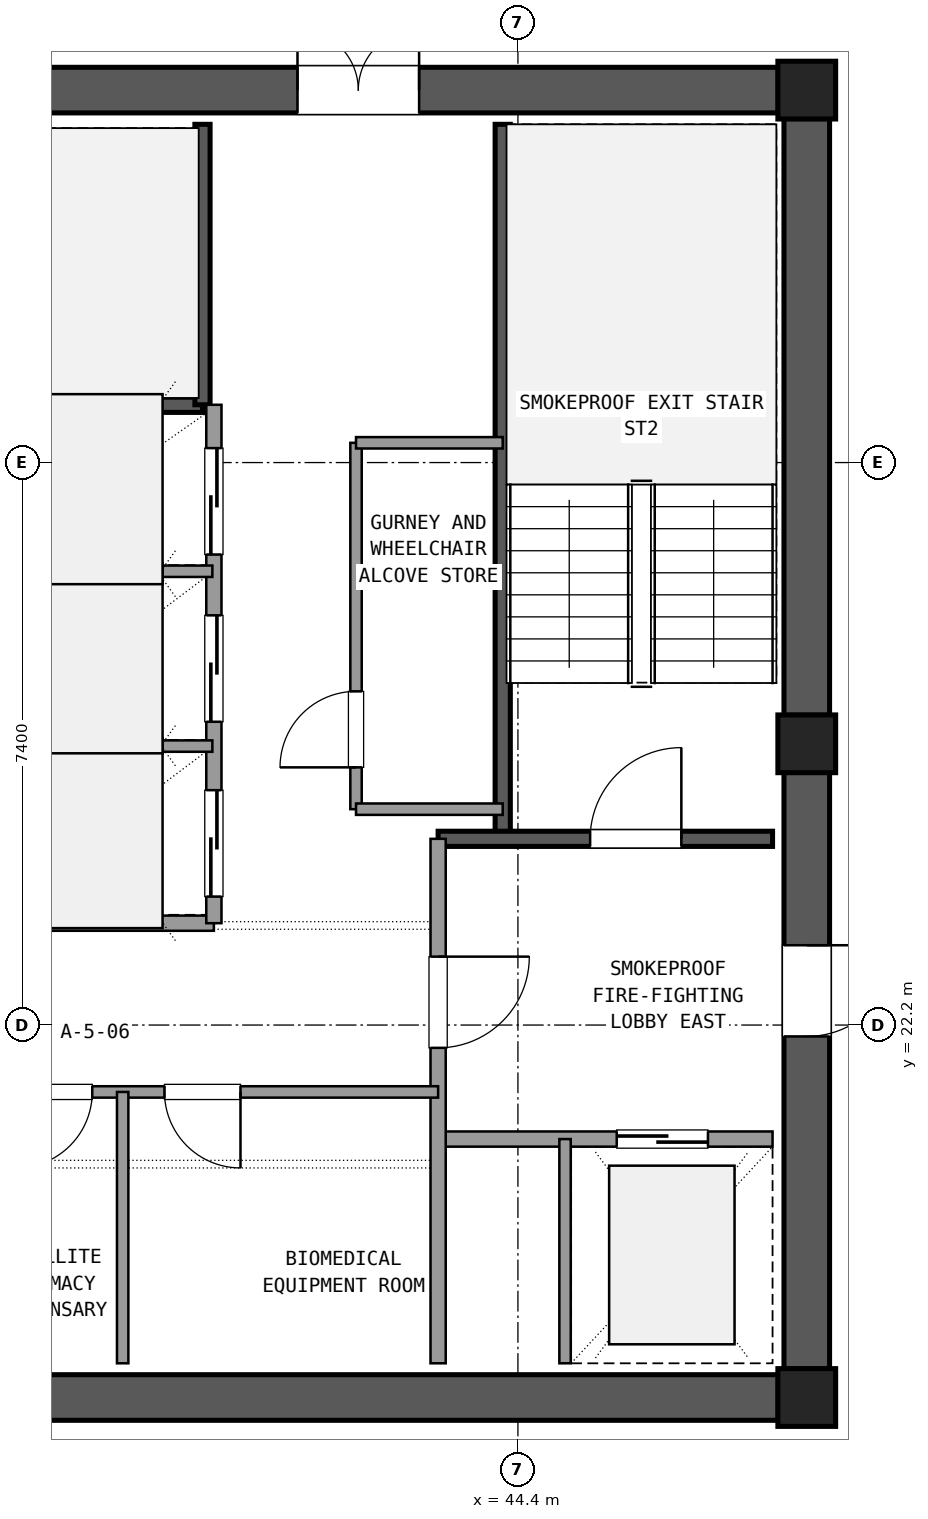
"""IFC4 building model, lengths in metres.
Left out: names, types, materials, properties, quantities, classifications, styles, units other than length and angle.
Written with IfcOpenShell. Run it as: python <this file> out.ifc"""

import sys

from ifc_helpers import new_model, si_unit, direction, frame, frame_2d, origin, origin_2d, place, context, subcontext, project, spatial, rectangle, extrude, element, fill, save


model = new_model("IFC4")
c1 = context("Model", 3, precision=1e-05, world=origin(), true_north=direction((0.0, 1.0)))
c2 = subcontext(c1, "Body", "Model", "MODEL_VIEW")
j1 = project(units=[si_unit("LENGTHUNIT", "METRE"), si_unit("PLANEANGLEUNIT", "RADIAN")], contexts=[c1])
p1 = place(None, origin())
s1 = spatial("IfcSite", under=j1, at=p1, CompositionType="ELEMENT")
p2 = place(p1, origin())
s2 = spatial("IfcBuilding", under=s1, at=p2, CompositionType="ELEMENT")
p3 = place(p2, frame((0.0, 0.0, 275.22)))
s3 = spatial("IfcBuildingStorey", under=s2, at=p3, CompositionType="ELEMENT", Elevation=275.22)
for number, where, z_axis, x_axis in (
    (1, (48.2, 17.3, 0.0), (0.0, 0.0, 1.0), (1.0, 0.0, 0.0)),
    (2, (48.2, 25.9, 0.0), (0.0, 0.0, 1.0), (1.0, 0.0, 0.0)),
    (3, (48.2, 34.5, 0.0), (0.0, 0.0, 1.0), (1.0, 0.0, 0.0)),
):
    element("IfcColumn", number, at=place(p3, frame(where, z_axis=z_axis, x_axis=x_axis)), inside=s3, PredefinedType="COLUMN", context=c2, shape_type="SweptSolid", body=[
        extrude(rectangle(XDim=0.76, YDim=0.76, at=origin_2d()), origin(), (0.0, 0.0, 1.0), 3.6),
    ])
p4 = place(p3, frame((37.375, 17.3, 0.0), z_axis=(0.0, 0.0, 1.0), x_axis=(1.0, 0.0, 0.0)))
e4 = element("IfcWall", 4, at=p4, inside=s3, PredefinedType="SHEAR", context=c2, shape_type="SweptSolid", body=[
    extrude(rectangle(XDim=10.45, YDim=0.6, at=frame_2d((5.225, 0.0))), origin(), (0.0, 0.0, 1.0), 3.32),
])
p5 = place(p3, frame((48.2, 17.675, 0.0), z_axis=(0.0, 0.0, 1.0), x_axis=(0.0, 1.0, 0.0)))
e5 = element("IfcWall", 5, at=p5, inside=s3, PredefinedType="SHEAR", context=c2, shape_type="SweptSolid", body=[
    extrude(rectangle(XDim=7.85, YDim=0.6, at=frame_2d((3.925, 0.0))), origin(), (0.0, 0.0, 1.0), 3.32),
])
p6 = place(p5, frame((4.375, 0.0, 0.0)))
e6 = element("IfcOpeningElement", 6, at=p6, cuts=e5, PredefinedType="OPENING", context=c2, shape_type="SweptSolid", body=[
    extrude(rectangle(XDim=1.2, YDim=2.15, at=frame_2d((0.6, 1.075))), frame((0.0, 0.31, 0.0), z_axis=(0.0, -1.0, 0.0), x_axis=(1.0, 0.0, 0.0)), (0.0, 0.0, 1.0), 0.62),
])
p7 = place(p3, frame((48.2, 26.275, 0.0), z_axis=(0.0, 0.0, 1.0), x_axis=(0.0, 1.0, 0.0)))
e7 = element("IfcWall", 7, at=p7, inside=s3, PredefinedType="SHEAR", context=c2, shape_type="SweptSolid", body=[
    extrude(rectangle(XDim=7.85, YDim=0.6, at=frame_2d((3.925, 0.0))), origin(), (0.0, 0.0, 1.0), 3.32),
])
p8 = place(p3, frame((47.825, 34.5, 0.0), z_axis=(0.0, 0.0, 1.0), x_axis=(-1.0, 0.0, 0.0)))
e8 = element("IfcWall", 8, at=p8, inside=s3, PredefinedType="SHEAR", context=c2, shape_type="SweptSolid", body=[
    extrude(rectangle(XDim=10.45, YDim=0.6, at=frame_2d((5.225, 0.0))), origin(), (0.0, 0.0, 1.0), 3.32),
])
p9 = place(p8, frame((4.725, 0.0, 0.0)))
e9 = element("IfcOpeningElement", 9, at=p9, cuts=e8, PredefinedType="OPENING", context=c2, shape_type="SweptSolid", body=[
    extrude(rectangle(XDim=1.6, YDim=2.2, at=frame_2d((0.8, 1.1))), frame((0.0, 0.31, 0.0), z_axis=(0.0, -1.0, 0.0), x_axis=(1.0, 0.0, 0.0)), (0.0, 0.0, 1.0), 0.62),
])
p10 = place(p3, frame((44.2, 24.65, 0.0), z_axis=(0.0, 0.0, 1.0), x_axis=(0.0, 1.0, 0.0)))
e10 = element("IfcWall", 10, at=p10, inside=s3, PredefinedType="SHEAR", context=c2, shape_type="SweptSolid", body=[
    extrude(rectangle(XDim=9.4, YDim=0.2, at=frame_2d((4.7, 0.0))), origin(), (0.0, 0.0, 1.0), 3.32),
])
p11 = place(p3, frame((43.35, 24.65, 0.0), z_axis=(0.0, 0.0, 1.0), x_axis=(1.0, 0.0, 0.0)))
e11 = element("IfcWall", 11, at=p11, inside=s3, PredefinedType="SHEAR", context=c2, shape_type="SweptSolid", body=[
    extrude(rectangle(XDim=4.4, YDim=0.2, at=frame_2d((2.2, 0.0))), origin(), (0.0, 0.0, 1.0), 3.32),
])
p12 = place(p11, frame((2.0, 0.0, 0.0)))
e12 = element("IfcOpeningElement", 12, at=p12, cuts=e11, PredefinedType="OPENING", context=c2, shape_type="SweptSolid", body=[
    extrude(rectangle(XDim=1.2, YDim=2.15, at=frame_2d((0.6, 1.075))), frame((0.0, 0.11, 0.0), z_axis=(0.0, -1.0, 0.0), x_axis=(1.0, 0.0, 0.0)), (0.0, 0.0, 1.0), 0.22),
])
p13 = place(p3, frame((30.75, 30.36, 0.0), z_axis=(0.0, 0.0, 1.0), x_axis=(1.0, 0.0, 0.0)))
e13 = element("IfcWall", 13, at=p13, inside=s3, PredefinedType="SHEAR", context=c2, shape_type="SweptSolid", body=[
    extrude(rectangle(XDim=9.5, YDim=0.2, at=frame_2d((4.75, 0.0))), origin(), (0.0, 0.0, 1.0), 3.32),
])
p14 = place(p3, frame((40.25, 30.36, 0.0), z_axis=(0.0, 0.0, 1.0), x_axis=(0.0, 1.0, 0.0)))
e14 = element("IfcWall", 14, at=p14, inside=s3, PredefinedType="SHEAR", context=c2, shape_type="SweptSolid", body=[
    extrude(rectangle(XDim=3.69, YDim=0.2, at=frame_2d((1.845, 0.0))), origin(), (0.0, 0.0, 1.0), 3.32),
])
p15 = place(p3, frame((43.35, 20.7, 0.0), z_axis=(0.0, 0.0, 1.0), x_axis=(1.0, 0.0, 0.0)))
e15 = element("IfcWall", 15, at=p15, inside=s3, PredefinedType="SOLIDWALL", context=c2, shape_type="SweptSolid", body=[
    extrude(rectangle(XDim=4.4, YDim=0.2, at=frame_2d((2.2, 0.0))), origin(), (0.0, 0.0, 1.0), 2.61),
])
p16 = place(p15, frame((2.35, 0.0, 0.0)))
e16 = element("IfcOpeningElement", 16, at=p16, cuts=e15, PredefinedType="OPENING", context=c2, shape_type="SweptSolid", body=[
    extrude(rectangle(XDim=1.2, YDim=2.15, at=frame_2d((0.6, 1.075))), frame((0.0, 0.11, 0.0), z_axis=(0.0, -1.0, 0.0), x_axis=(1.0, 0.0, 0.0)), (0.0, 0.0, 1.0), 0.22),
])
p17 = place(p3, frame((43.35, 17.75, 0.0), z_axis=(0.0, 0.0, 1.0), x_axis=(0.0, 1.0, 0.0)))
e17 = element("IfcWall", 17, at=p17, inside=s3, PredefinedType="SOLIDWALL", context=c2, shape_type="SweptSolid", body=[
    extrude(rectangle(XDim=6.9, YDim=0.2, at=frame_2d((3.45, 0.0))), origin(), (0.0, 0.0, 1.0), 2.61),
])
p18 = place(p17, frame((4.15, 0.0, 0.0)))
e18 = element("IfcOpeningElement", 18, at=p18, cuts=e17, PredefinedType="OPENING", context=c2, shape_type="SweptSolid", body=[
    extrude(rectangle(XDim=1.2, YDim=2.15, at=frame_2d((0.6, 1.075))), frame((0.0, 0.11, 0.0), z_axis=(0.0, -1.0, 0.0), x_axis=(1.0, 0.0, 0.0)), (0.0, 0.0, 1.0), 0.22),
])
p19 = place(p3, frame((45.02, 17.75, 0.0), z_axis=(0.0, 0.0, 1.0), x_axis=(0.0, 1.0, 0.0)))
e19 = element("IfcWall", 19, at=p19, inside=s3, PredefinedType="PARTITIONING", context=c2, shape_type="SweptSolid", body=[
    extrude(rectangle(XDim=2.95, YDim=0.15, at=frame_2d((1.475, 0.0))), origin(), (0.0, 0.0, 1.0), 2.61),
])
p20 = place(p3, frame((37.25, 21.32, 0.0), z_axis=(0.0, 0.0, 1.0), x_axis=(1.0, 0.0, 0.0)))
e20 = element("IfcWall", 20, at=p20, inside=s3, PredefinedType="PARTITIONING", context=c2, shape_type="SweptSolid", body=[
    extrude(rectangle(XDim=6.1, YDim=0.15, at=frame_2d((3.05, 0.0))), origin(), (0.0, 0.0, 1.0), 2.61),
])
p21 = place(p20, frame((0.55, 0.0, 0.0)))
e21 = element("IfcOpeningElement", 21, at=p21, cuts=e20, PredefinedType="OPENING", context=c2, shape_type="SweptSolid", body=[
    extrude(rectangle(XDim=1.0, YDim=2.15, at=frame_2d((0.5, 1.075))), frame((0.0, 0.085, 0.0), z_axis=(0.0, -1.0, 0.0), x_axis=(1.0, 0.0, 0.0)), (0.0, 0.0, 1.0), 0.17),
])
p22 = place(p20, frame((2.5, 0.0, 0.0)))
e22 = element("IfcOpeningElement", 22, at=p22, cuts=e20, PredefinedType="OPENING", context=c2, shape_type="SweptSolid", body=[
    extrude(rectangle(XDim=1.0, YDim=2.15, at=frame_2d((0.5, 1.075))), frame((0.0, 0.085, 0.0), z_axis=(0.0, -1.0, 0.0), x_axis=(1.0, 0.0, 0.0)), (0.0, 0.0, 1.0), 0.17),
])
p23 = place(p3, frame((39.2, 17.75, 0.0), z_axis=(0.0, 0.0, 1.0), x_axis=(0.0, 1.0, 0.0)))
e23 = element("IfcWall", 23, at=p23, inside=s3, PredefinedType="PARTITIONING", context=c2, shape_type="SweptSolid", body=[
    extrude(rectangle(XDim=3.57, YDim=0.15, at=frame_2d((1.785, 0.0))), origin(), (0.0, 0.0, 1.0), 2.61),
])
p24 = place(p3, frame((37.35, 23.54, 0.0), z_axis=(0.0, 0.0, 1.0), x_axis=(1.0, 0.0, 0.0)))
e24 = element("IfcWall", 24, at=p24, inside=s3, PredefinedType="SOLIDWALL", context=c2, shape_type="SweptSolid", body=[
    extrude(rectangle(XDim=3.05, YDim=0.2, at=frame_2d((1.525, 0.0))), origin(), (0.0, 0.0, 1.0), 2.61),
])
p25 = place(p3, frame((40.4, 23.54, 0.0), z_axis=(0.0, 0.0, 1.0), x_axis=(0.0, 1.0, 0.0)))
e25 = element("IfcWall", 25, at=p25, inside=s3, PredefinedType="SOLIDWALL", context=c2, shape_type="SweptSolid", body=[
    extrude(rectangle(XDim=6.82, YDim=0.2, at=frame_2d((3.41, 0.0))), origin(), (0.0, 0.0, 1.0), 2.61),
])
p26 = place(p25, frame((0.35, 0.0, 0.0)))
e26 = element("IfcOpeningElement", 26, at=p26, cuts=e25, PredefinedType="OPENING", context=c2, shape_type="SweptSolid", body=[
    extrude(rectangle(XDim=1.4, YDim=2.2, at=frame_2d((0.7, 1.1))), frame((0.0, 0.11, 0.0), z_axis=(0.0, -1.0, 0.0), x_axis=(1.0, 0.0, 0.0)), (0.0, 0.0, 1.0), 0.22),
])
p27 = place(p25, frame((2.65, 0.0, 0.0)))
e27 = element("IfcOpeningElement", 27, at=p27, cuts=e25, PredefinedType="OPENING", context=c2, shape_type="SweptSolid", body=[
    extrude(rectangle(XDim=1.4, YDim=2.2, at=frame_2d((0.7, 1.1))), frame((0.0, 0.11, 0.0), z_axis=(0.0, -1.0, 0.0), x_axis=(1.0, 0.0, 0.0)), (0.0, 0.0, 1.0), 0.22),
])
p28 = place(p25, frame((4.85, 0.0, 0.0)))
e28 = element("IfcOpeningElement", 28, at=p28, cuts=e25, PredefinedType="OPENING", context=c2, shape_type="SweptSolid", body=[
    extrude(rectangle(XDim=1.4, YDim=2.2, at=frame_2d((0.7, 1.1))), frame((0.0, 0.11, 0.0), z_axis=(0.0, -1.0, 0.0), x_axis=(1.0, 0.0, 0.0)), (0.0, 0.0, 1.0), 0.22),
])
for number, where, z_axis, x_axis in (
    (29, (37.37, 25.87, 0.0), (0.0, 0.0, 1.0), (1.0, 0.0, 0.0)),
    (30, (37.37, 28.17, 0.0), (0.0, 0.0, 1.0), (1.0, 0.0, 0.0)),
):
    element("IfcWall", number, at=place(p3, frame(where, z_axis=z_axis, x_axis=x_axis)), inside=s3, PredefinedType="PARTITIONING", context=c2, shape_type="SweptSolid", body=[
        extrude(rectangle(XDim=3.01, YDim=0.15, at=frame_2d((1.505, 0.0))), origin(), (0.0, 0.0, 1.0), 2.61),
    ])
p29 = place(p3, frame((42.27, 25.04, 0.0), z_axis=(0.0, 0.0, 1.0), x_axis=(0.0, 1.0, 0.0)))
e31 = element("IfcWall", 31, at=p29, inside=s3, PredefinedType="PARTITIONING", context=c2, shape_type="SweptSolid", body=[
    extrude(rectangle(XDim=4.82, YDim=0.15, at=frame_2d((2.41, 0.0))), origin(), (0.0, 0.0, 1.0), 2.61),
])
p30 = place(p29, frame((0.55, 0.0, 0.0)))
e32 = element("IfcOpeningElement", 32, at=p30, cuts=e31, PredefinedType="OPENING", context=c2, shape_type="SweptSolid", body=[
    extrude(rectangle(XDim=1.0, YDim=2.15, at=frame_2d((0.5, 1.075))), frame((0.0, 0.085, 0.0), z_axis=(0.0, -1.0, 0.0), x_axis=(1.0, 0.0, 0.0)), (0.0, 0.0, 1.0), 0.17),
])
for number, where, z_axis, x_axis in (
    (33, (42.27, 25.04, 0.0), (0.0, 0.0, 1.0), (1.0, 0.0, 0.0)),
    (34, (42.27, 29.86, 0.0), (0.0, 0.0, 1.0), (1.0, 0.0, 0.0)),
):
    element("IfcWall", number, at=place(p3, frame(where, z_axis=z_axis, x_axis=x_axis)), inside=s3, PredefinedType="PARTITIONING", context=c2, shape_type="SweptSolid", body=[
        extrude(rectangle(XDim=1.93, YDim=0.15, at=frame_2d((0.965, 0.0))), origin(), (0.0, 0.0, 1.0), 2.61),
    ])
p31 = place(p12, origin())
e35 = element("IfcDoor", 35, at=p31, inside=s3, OperationType="SINGLE_SWING_RIGHT", PredefinedType="DOOR", context=c2, shape_type="SweptSolid", body=[
    extrude(rectangle(XDim=1.2, YDim=2.15, at=frame_2d((0.6, 1.075))), frame((0.0, 0.025, 0.0), z_axis=(0.0, -1.0, 0.0), x_axis=(1.0, 0.0, 0.0)), (0.0, 0.0, 1.0), 0.05),
])
fill(e12, e35)
p32 = place(p16, origin())
e36 = element("IfcDoor", 36, at=p32, inside=s3, OperationType="SLIDING_TO_RIGHT", PredefinedType="DOOR", context=c2, shape_type="SweptSolid", body=[
    extrude(rectangle(XDim=1.2, YDim=2.15, at=frame_2d((0.6, 1.075))), frame((0.0, 0.025, 0.0), z_axis=(0.0, -1.0, 0.0), x_axis=(1.0, 0.0, 0.0)), (0.0, 0.0, 1.0), 0.05),
])
fill(e16, e36)
p33 = place(p18, frame((1.2, 0.0, 0.0), z_axis=(0.0, 0.0, 1.0), x_axis=(-1.0, 0.0, 0.0)))
e37 = element("IfcDoor", 37, at=p33, inside=s3, OperationType="SINGLE_SWING_RIGHT", PredefinedType="DOOR", context=c2, shape_type="SweptSolid", body=[
    extrude(rectangle(XDim=1.2, YDim=2.15, at=frame_2d((0.6, 1.075))), frame((0.0, 0.025, 0.0), z_axis=(0.0, -1.0, 0.0), x_axis=(1.0, 0.0, 0.0)), (0.0, 0.0, 1.0), 0.05),
])
fill(e18, e37)
p34 = place(p6, frame((1.2, 0.0, 0.0), z_axis=(0.0, 0.0, 1.0), x_axis=(-1.0, 0.0, 0.0)))
e38 = element("IfcDoor", 38, at=p34, inside=s3, OperationType="SINGLE_SWING_RIGHT", PredefinedType="DOOR", context=c2, shape_type="SweptSolid", body=[
    extrude(rectangle(XDim=1.2, YDim=2.15, at=frame_2d((0.6, 1.075))), frame((0.0, 0.025, 0.0), z_axis=(0.0, -1.0, 0.0), x_axis=(1.0, 0.0, 0.0)), (0.0, 0.0, 1.0), 0.05),
])
fill(e6, e38)
p35 = place(p9, frame((1.6, 0.0, 0.0), z_axis=(0.0, 0.0, 1.0), x_axis=(-1.0, 0.0, 0.0)))
e39 = element("IfcDoor", 39, at=p35, inside=s3, OperationType="DOUBLE_DOOR_SINGLE_SWING", PredefinedType="DOOR", context=c2, shape_type="SweptSolid", body=[
    extrude(rectangle(XDim=1.6, YDim=2.2, at=frame_2d((0.8, 1.1))), frame((0.0, 0.025, 0.0), z_axis=(0.0, -1.0, 0.0), x_axis=(1.0, 0.0, 0.0)), (0.0, 0.0, 1.0), 0.05),
])
fill(e9, e39)
p36 = place(p21, frame((1.0, 0.0, 0.0), z_axis=(0.0, 0.0, 1.0), x_axis=(-1.0, 0.0, 0.0)))
e40 = element("IfcDoor", 40, at=p36, inside=s3, OperationType="SINGLE_SWING_LEFT", PredefinedType="DOOR", context=c2, shape_type="SweptSolid", body=[
    extrude(rectangle(XDim=1.0, YDim=2.15, at=frame_2d((0.5, 1.075))), frame((0.0, 0.025, 0.0), z_axis=(0.0, -1.0, 0.0), x_axis=(1.0, 0.0, 0.0)), (0.0, 0.0, 1.0), 0.05),
])
fill(e21, e40)
p37 = place(p22, frame((1.0, 0.0, 0.0), z_axis=(0.0, 0.0, 1.0), x_axis=(-1.0, 0.0, 0.0)))
e41 = element("IfcDoor", 41, at=p37, inside=s3, OperationType="SINGLE_SWING_RIGHT", PredefinedType="DOOR", context=c2, shape_type="SweptSolid", body=[
    extrude(rectangle(XDim=1.0, YDim=2.15, at=frame_2d((0.5, 1.075))), frame((0.0, 0.025, 0.0), z_axis=(0.0, -1.0, 0.0), x_axis=(1.0, 0.0, 0.0)), (0.0, 0.0, 1.0), 0.05),
])
fill(e22, e41)
p38 = place(p26, origin())
e42 = element("IfcDoor", 42, at=p38, inside=s3, OperationType="SLIDING_TO_LEFT", PredefinedType="DOOR", context=c2, shape_type="SweptSolid", body=[
    extrude(rectangle(XDim=1.4, YDim=2.2, at=frame_2d((0.7, 1.1))), frame((0.0, 0.025, 0.0), z_axis=(0.0, -1.0, 0.0), x_axis=(1.0, 0.0, 0.0)), (0.0, 0.0, 1.0), 0.05),
])
fill(e26, e42)
p39 = place(p27, origin())
e43 = element("IfcDoor", 43, at=p39, inside=s3, OperationType="SLIDING_TO_LEFT", PredefinedType="DOOR", context=c2, shape_type="SweptSolid", body=[
    extrude(rectangle(XDim=1.4, YDim=2.2, at=frame_2d((0.7, 1.1))), frame((0.0, 0.025, 0.0), z_axis=(0.0, -1.0, 0.0), x_axis=(1.0, 0.0, 0.0)), (0.0, 0.0, 1.0), 0.05),
])
fill(e27, e43)
p40 = place(p28, origin())
e44 = element("IfcDoor", 44, at=p40, inside=s3, OperationType="SLIDING_TO_RIGHT", PredefinedType="DOOR", context=c2, shape_type="SweptSolid", body=[
    extrude(rectangle(XDim=1.4, YDim=2.2, at=frame_2d((0.7, 1.1))), frame((0.0, 0.025, 0.0), z_axis=(0.0, -1.0, 0.0), x_axis=(1.0, 0.0, 0.0)), (0.0, 0.0, 1.0), 0.05),
])
fill(e28, e44)
p41 = place(p30, origin())
e45 = element("IfcDoor", 45, at=p41, inside=s3, OperationType="SINGLE_SWING_LEFT", PredefinedType="DOOR", context=c2, shape_type="SweptSolid", body=[
    extrude(rectangle(XDim=1.0, YDim=2.15, at=frame_2d((0.5, 1.075))), frame((0.0, 0.025, 0.0), z_axis=(0.0, -1.0, 0.0), x_axis=(1.0, 0.0, 0.0)), (0.0, 0.0, 1.0), 0.05),
])
fill(e32, e45)
save(model, sys.argv[1])
